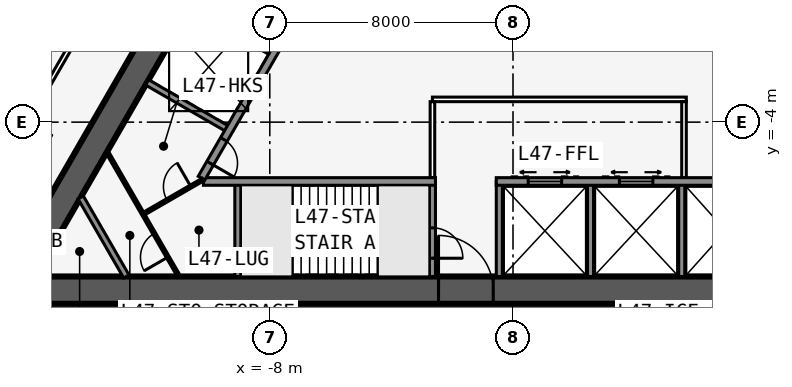
"""IFC4 building model, lengths in metres.
Left out: names, types, materials, properties, quantities, classifications, styles, units other than length and angle.
Written with IfcOpenShell. Run it as: python <this file> out.ifc"""

import sys

from ifc_helpers import new_model, si_unit, direction, frame, frame_2d, origin, place, context, subcontext, project, spatial, rectangle, extrude, element, fill, save


model = new_model("IFC4")
c1 = context("Model", 3, precision=1e-05, world=origin(), true_north=direction((0.0, 1.0)))
c2 = subcontext(c1, "Body", "Model", "MODEL_VIEW")
j1 = project(units=[si_unit("LENGTHUNIT", "METRE"), si_unit("PLANEANGLEUNIT", "RADIAN")], contexts=[c1])
p1 = place(None, origin())
s1 = spatial("IfcSite", under=j1, at=p1, CompositionType="ELEMENT")
p2 = place(p1, origin())
s2 = spatial("IfcBuilding", under=s1, at=p2, CompositionType="ELEMENT")
p3 = place(p2, frame((0.0, 0.0, 175.9)))
s3 = spatial("IfcBuildingStorey", under=s2, at=p3, CompositionType="ELEMENT", Elevation=175.9)
p4 = place(p3, frame((-16.5, -9.526, 0.0), z_axis=(0.0, 0.0, 1.0), x_axis=(1.0, 0.0, 0.0)))
e1 = element("IfcWall", 1, at=p4, inside=s3, PredefinedType="SHEAR", context=c2, shape_type="SweptSolid", body=[
    extrude(rectangle(XDim=33.0, YDim=0.9, at=frame_2d((16.5, 0.0))), origin(), (0.0, 0.0, 1.0), 3.4),
])
p5 = place(p4, frame((14.05, 0.0, 0.0)))
e2 = element("IfcOpeningElement", 2, at=p5, cuts=e1, PredefinedType="OPENING", context=c2, shape_type="SweptSolid", body=[
    extrude(rectangle(XDim=1.8, YDim=2.13, at=frame_2d((0.9, 1.065))), frame((0.0, 0.46, 0.0), z_axis=(0.0, -1.0, 0.0), x_axis=(1.0, 0.0, 0.0)), (0.0, 0.0, 1.0), 0.92),
])
p6 = place(p3, frame((-10.183, -5.951, 0.0), z_axis=(0.0, 0.0, 1.0), x_axis=(1.0, 0.0, 0.0)))
e3 = element("IfcWall", 3, at=p6, inside=s3, PredefinedType="SOLIDWALL", context=c2, shape_type="SweptSolid", body=[
    extrude(rectangle(XDim=7.633, YDim=0.25, at=frame_2d((3.816, 0.0))), origin(), (0.0, 0.0, 1.0), 3.235),
])
p7 = place(p3, frame((-0.55, -5.951, 0.0), z_axis=(0.0, 0.0, 1.0), x_axis=(1.0, 0.0, 0.0)))
e4 = element("IfcWall", 4, at=p7, inside=s3, PredefinedType="SOLIDWALL", context=c2, shape_type="SweptSolid", body=[
    extrude(rectangle(XDim=10.733, YDim=0.25, at=frame_2d((5.366, 0.0))), origin(), (0.0, 0.0, 1.0), 3.235),
])
p8 = place(p7, frame((9.314, 0.0, 0.0)))
e5 = element("IfcOpeningElement", 5, at=p8, cuts=e4, PredefinedType="OPENING", context=c2, shape_type="SweptSolid", body=[
    extrude(rectangle(XDim=0.9, YDim=2.13, at=frame_2d((0.45, 1.065))), frame((0.0, 0.135, 0.0), z_axis=(0.0, -1.0, 0.0), x_axis=(1.0, 0.0, 0.0)), (0.0, 0.0, 1.0), 0.27),
])
p9 = place(p7, frame((1.05, 0.0, 0.0)))
e6 = element("IfcOpeningElement", 6, at=p9, cuts=e4, PredefinedType="OPENING", context=c2, shape_type="SweptSolid", body=[
    extrude(rectangle(XDim=1.1, YDim=2.13, at=frame_2d((0.55, 1.065))), frame((0.0, 0.135, 0.0), z_axis=(0.0, -1.0, 0.0), x_axis=(1.0, 0.0, 0.0)), (0.0, 0.0, 1.0), 0.27),
])
p10 = place(p7, frame((4.05, 0.0, 0.0)))
e7 = element("IfcOpeningElement", 7, at=p10, cuts=e4, PredefinedType="OPENING", context=c2, shape_type="SweptSolid", body=[
    extrude(rectangle(XDim=1.1, YDim=2.13, at=frame_2d((0.55, 1.065))), frame((0.0, 0.135, 0.0), z_axis=(0.0, -1.0, 0.0), x_axis=(1.0, 0.0, 0.0)), (0.0, 0.0, 1.0), 0.27),
])
p11 = place(p3, frame((-9.05, -5.951, 0.0), z_axis=(0.0, 0.0, 1.0), x_axis=(0.0, -1.0, 0.0)))
e8 = element("IfcWall", 8, at=p11, inside=s3, PredefinedType="SOLIDWALL", context=c2, shape_type="SweptSolid", body=[
    extrude(rectangle(XDim=3.125, YDim=0.2, at=frame_2d((1.562, 0.0))), origin(), (0.0, 0.0, 1.0), 3.235),
])
p12 = place(p3, frame((-2.65, -5.951, 0.0), z_axis=(0.0, 0.0, 1.0), x_axis=(0.0, -1.0, 0.0)))
e9 = element("IfcWall", 9, at=p12, inside=s3, PredefinedType="SOLIDWALL", context=c2, shape_type="SweptSolid", body=[
    extrude(rectangle(XDim=3.125, YDim=0.2, at=frame_2d((1.562, 0.0))), origin(), (0.0, 0.0, 1.0), 3.235),
])
p13 = place(p12, frame((1.525, 0.0, 0.0)))
e10 = element("IfcOpeningElement", 10, at=p13, cuts=e9, PredefinedType="OPENING", context=c2, shape_type="SweptSolid", body=[
    extrude(rectangle(XDim=1.0, YDim=2.13, at=frame_2d((0.5, 1.065))), frame((0.0, 0.11, 0.0), z_axis=(0.0, -1.0, 0.0), x_axis=(1.0, 0.0, 0.0)), (0.0, 0.0, 1.0), 0.22),
])
for number, where, z_axis, x_axis in (
    (11, (-0.45, -5.951, 0.0), (0.0, 0.0, 1.0), (0.0, -1.0, 0.0)),
    (12, (2.55, -5.951, 0.0), (0.0, 0.0, 1.0), (0.0, -1.0, 0.0)),
    (13, (5.55, -5.951, 0.0), (0.0, 0.0, 1.0), (0.0, -1.0, 0.0)),
):
    element("IfcWall", number, at=place(p3, frame(where, z_axis=z_axis, x_axis=x_axis)), inside=s3, PredefinedType="SOLIDWALL", context=c2, shape_type="SweptSolid", body=[
        extrude(rectangle(XDim=3.125, YDim=0.2, at=frame_2d((1.562, 0.0))), origin(), (0.0, 0.0, 1.0), 3.235),
    ])
p14 = place(p3, frame((16.5, -9.526, 0.0), z_axis=(0.0, 0.0, 1.0), x_axis=(-0.499999749417, 0.866025548458, 0.0)))
e14 = element("IfcWall", 14, at=p14, inside=s3, PredefinedType="SHEAR", context=c2, shape_type="SweptSolid", body=[
    extrude(rectangle(XDim=33.0, YDim=0.9, at=frame_2d((16.5, 0.0))), origin(), (0.0, 0.0, 1.0), 3.4),
])
p15 = place(p14, frame((14.15, 0.0, 0.0)))
e15 = element("IfcOpeningElement", 15, at=p15, cuts=e14, PredefinedType="OPENING", context=c2, shape_type="SweptSolid", body=[
    extrude(rectangle(XDim=1.8, YDim=2.13, at=frame_2d((0.9, 1.065))), frame((0.0, 0.46, 0.0), z_axis=(0.0, -1.0, 0.0), x_axis=(1.0, 0.0, 0.0)), (0.0, 0.0, 1.0), 0.92),
])
p16 = place(p14, frame((12.6, 0.0, 0.0)))
e16 = element("IfcOpeningElement", 16, at=p16, cuts=e14, PredefinedType="OPENING", context=c2, shape_type="SweptSolid", body=[
    extrude(rectangle(XDim=1.0, YDim=2.13, at=frame_2d((0.5, 1.065))), frame((0.0, 0.46, 0.0), z_axis=(0.0, -1.0, 0.0), x_axis=(1.0, 0.0, 0.0)), (0.0, 0.0, 1.0), 0.92),
])
p17 = place(p3, frame((10.245, -5.843, 0.0), z_axis=(0.0, 0.0, 1.0), x_axis=(-0.499993009313, 0.866029439822, 0.0)))
e17 = element("IfcWall", 17, at=p17, inside=s3, PredefinedType="SOLIDWALL", context=c2, shape_type="SweptSolid", body=[
    extrude(rectangle(XDim=7.733, YDim=0.25, at=frame_2d((3.866, 0.0))), origin(), (0.0, 0.0, 1.0), 3.235),
])
p18 = place(p3, frame((0.0, 19.052, 0.0), z_axis=(0.0, 0.0, 1.0), x_axis=(-0.499999749417, -0.866025548458, 0.0)))
e18 = element("IfcWall", 18, at=p18, inside=s3, PredefinedType="SHEAR", context=c2, shape_type="SweptSolid", body=[
    extrude(rectangle(XDim=33.0, YDim=0.9, at=frame_2d((16.5, 0.0))), origin(), (0.0, 0.0, 1.0), 3.4),
])
p19 = place(p18, frame((14.15, 0.0, 0.0)))
e19 = element("IfcOpeningElement", 19, at=p19, cuts=e18, PredefinedType="OPENING", context=c2, shape_type="SweptSolid", body=[
    extrude(rectangle(XDim=1.8, YDim=2.13, at=frame_2d((0.9, 1.065))), frame((0.0, 0.46, 0.0), z_axis=(0.0, -1.0, 0.0), x_axis=(1.0, 0.0, 0.0)), (0.0, 0.0, 1.0), 0.92),
])
p20 = place(p18, frame((12.6, 0.0, 0.0)))
e20 = element("IfcOpeningElement", 20, at=p20, cuts=e18, PredefinedType="OPENING", context=c2, shape_type="SweptSolid", body=[
    extrude(rectangle(XDim=1.0, YDim=2.13, at=frame_2d((0.5, 1.065))), frame((0.0, 0.46, 0.0), z_axis=(0.0, -1.0, 0.0), x_axis=(1.0, 0.0, 0.0)), (0.0, 0.0, 1.0), 0.92),
])
p21 = place(p3, frame((-4.929, 3.365, 0.0), z_axis=(0.0, 0.0, 1.0), x_axis=(-0.499991433582, -0.866030349552, 0.0)))
e21 = element("IfcWall", 21, at=p21, inside=s3, PredefinedType="SOLIDWALL", context=c2, shape_type="SweptSolid", body=[
    extrude(rectangle(XDim=10.633, YDim=0.25, at=frame_2d((5.316, 0.0))), origin(), (0.0, 0.0, 1.0), 3.235),
])
p22 = place(p21, frame((9.164, 0.0, 0.0)))
e22 = element("IfcOpeningElement", 22, at=p22, cuts=e21, PredefinedType="OPENING", context=c2, shape_type="SweptSolid", body=[
    extrude(rectangle(XDim=0.9, YDim=2.13, at=frame_2d((0.45, 1.065))), frame((0.0, 0.135, 0.0), z_axis=(0.0, -1.0, 0.0), x_axis=(1.0, 0.0, 0.0)), (0.0, 0.0, 1.0), 0.27),
])
for number, where, z_axis, x_axis in (
    (23, (-7.879, -1.744, 0.0), (0.0, 0.0, 1.0), (-0.866, 0.5, 0.0)),
    (24, (-9.329, -4.256, 0.0), (0.0, 0.0, 1.0), (-0.866, 0.5, 0.0)),
):
    element("IfcWall", number, at=place(p3, frame(where, z_axis=z_axis, x_axis=x_axis)), inside=s3, PredefinedType="SOLIDWALL", context=c2, shape_type="SweptSolid", body=[
        extrude(rectangle(XDim=3.125, YDim=0.2, at=frame_2d((1.562, 0.0))), origin(), (0.0, 0.0, 1.0), 3.235),
    ])
p23 = place(p3, frame((20.027, -10.985, 0.0), z_axis=(0.0, 0.0, 1.0), x_axis=(-0.500001677587, 0.866024435227, 0.0)))
e25 = element("IfcWall", 25, at=p23, inside=s3, PredefinedType="PARTITIONING", context=c2, shape_type="SweptSolid", body=[
    extrude(rectangle(XDim=39.054, YDim=0.15, at=frame_2d((19.527, 0.0))), origin(), (0.0, 0.0, 1.0), 3.235),
])
p24 = place(p23, frame((1.558, 0.0, 0.0)))
e26 = element("IfcOpeningElement", 26, at=p24, cuts=e25, PredefinedType="OPENING", context=c2, shape_type="SweptSolid", body=[
    extrude(rectangle(XDim=0.95, YDim=2.13, at=frame_2d((0.475, 1.065))), frame((0.0, 0.085, 0.0), z_axis=(0.0, -1.0, 0.0), x_axis=(1.0, 0.0, 0.0)), (0.0, 0.0, 1.0), 0.17),
])
p25 = place(p23, frame((11.552, 0.0, 0.0)))
e27 = element("IfcOpeningElement", 27, at=p25, cuts=e25, PredefinedType="OPENING", context=c2, shape_type="SweptSolid", body=[
    extrude(rectangle(XDim=0.95, YDim=2.13, at=frame_2d((0.475, 1.065))), frame((0.0, 0.085, 0.0), z_axis=(0.0, -1.0, 0.0), x_axis=(1.0, 0.0, 0.0)), (0.0, 0.0, 1.0), 0.17),
])
p26 = place(p23, frame((25.352, 0.0, 0.0)))
e28 = element("IfcOpeningElement", 28, at=p26, cuts=e25, PredefinedType="OPENING", context=c2, shape_type="SweptSolid", body=[
    extrude(rectangle(XDim=0.95, YDim=2.13, at=frame_2d((0.475, 1.065))), frame((0.0, 0.085, 0.0), z_axis=(0.0, -1.0, 0.0), x_axis=(1.0, 0.0, 0.0)), (0.0, 0.0, 1.0), 0.17),
])
p27 = place(p23, frame((36.546, 0.0, 0.0)))
e29 = element("IfcOpeningElement", 29, at=p27, cuts=e25, PredefinedType="OPENING", context=c2, shape_type="SweptSolid", body=[
    extrude(rectangle(XDim=0.95, YDim=2.13, at=frame_2d((0.475, 1.065))), frame((0.0, 0.085, 0.0), z_axis=(0.0, -1.0, 0.0), x_axis=(1.0, 0.0, 0.0)), (0.0, 0.0, 1.0), 0.17),
])
p28 = place(p3, frame((-0.5, 22.836, 0.0), z_axis=(0.0, 0.0, 1.0), x_axis=(-0.500001677587, -0.866024435227, 0.0)))
e30 = element("IfcWall", 30, at=p28, inside=s3, PredefinedType="PARTITIONING", context=c2, shape_type="SweptSolid", body=[
    extrude(rectangle(XDim=39.054, YDim=0.15, at=frame_2d((19.527, 0.0))), origin(), (0.0, 0.0, 1.0), 3.235),
])
p29 = place(p28, frame((0.352, 0.0, 0.0)))
e31 = element("IfcOpeningElement", 31, at=p29, cuts=e30, PredefinedType="OPENING", context=c2, shape_type="SweptSolid", body=[
    extrude(rectangle(XDim=0.95, YDim=2.13, at=frame_2d((0.475, 1.065))), frame((0.0, 0.085, 0.0), z_axis=(0.0, -1.0, 0.0), x_axis=(1.0, 0.0, 0.0)), (0.0, 0.0, 1.0), 0.17),
])
p30 = place(p28, frame((6.552, 0.0, 0.0)))
e32 = element("IfcOpeningElement", 32, at=p30, cuts=e30, PredefinedType="OPENING", context=c2, shape_type="SweptSolid", body=[
    extrude(rectangle(XDim=0.95, YDim=2.13, at=frame_2d((0.475, 1.065))), frame((0.0, 0.085, 0.0), z_axis=(0.0, -1.0, 0.0), x_axis=(1.0, 0.0, 0.0)), (0.0, 0.0, 1.0), 0.17),
])
p31 = place(p28, frame((15.952, 0.0, 0.0)))
e33 = element("IfcOpeningElement", 33, at=p31, cuts=e30, PredefinedType="OPENING", context=c2, shape_type="SweptSolid", body=[
    extrude(rectangle(XDim=0.95, YDim=2.13, at=frame_2d((0.475, 1.065))), frame((0.0, 0.085, 0.0), z_axis=(0.0, -1.0, 0.0), x_axis=(1.0, 0.0, 0.0)), (0.0, 0.0, 1.0), 0.17),
])
p32 = place(p28, frame((21.552, 0.0, 0.0)))
e34 = element("IfcOpeningElement", 34, at=p32, cuts=e30, PredefinedType="OPENING", context=c2, shape_type="SweptSolid", body=[
    extrude(rectangle(XDim=0.95, YDim=2.13, at=frame_2d((0.475, 1.065))), frame((0.0, 0.085, 0.0), z_axis=(0.0, -1.0, 0.0), x_axis=(1.0, 0.0, 0.0)), (0.0, 0.0, 1.0), 0.17),
])
p33 = place(p28, frame((30.952, 0.0, 0.0)))
e35 = element("IfcOpeningElement", 35, at=p33, cuts=e30, PredefinedType="OPENING", context=c2, shape_type="SweptSolid", body=[
    extrude(rectangle(XDim=0.95, YDim=2.13, at=frame_2d((0.475, 1.065))), frame((0.0, 0.085, 0.0), z_axis=(0.0, -1.0, 0.0), x_axis=(1.0, 0.0, 0.0)), (0.0, 0.0, 1.0), 0.17),
])
p34 = place(p28, frame((37.752, 0.0, 0.0)))
e36 = element("IfcOpeningElement", 36, at=p34, cuts=e30, PredefinedType="OPENING", context=c2, shape_type="SweptSolid", body=[
    extrude(rectangle(XDim=0.95, YDim=2.13, at=frame_2d((0.475, 1.065))), frame((0.0, 0.085, 0.0), z_axis=(0.0, -1.0, 0.0), x_axis=(1.0, 0.0, 0.0)), (0.0, 0.0, 1.0), 0.17),
])
p35 = place(p3, frame((-2.65, -3.251, 0.0), z_axis=(0.0, 0.0, 1.0), x_axis=(1.0, 0.0, 0.0)))
e37 = element("IfcWall", 37, at=p35, inside=s3, PredefinedType="PARTITIONING", context=c2, shape_type="SweptSolid", body=[
    extrude(rectangle(XDim=8.35, YDim=0.15, at=frame_2d((4.175, 0.0))), origin(), (0.0, 0.0, 1.0), 3.235),
])
for number, where, z_axis, x_axis in (
    (38, (-2.65, -5.826, 0.0), (0.0, 0.0, 1.0), (0.0, 1.0, 0.0)),
    (39, (5.625, -5.826, 0.0), (0.0, 0.0, 1.0), (0.0, 1.0, 0.0)),
):
    element("IfcWall", number, at=place(p3, frame(where, z_axis=z_axis, x_axis=x_axis)), inside=s3, PredefinedType="PARTITIONING", context=c2, shape_type="SweptSolid", body=[
        extrude(rectangle(XDim=2.5, YDim=0.15, at=frame_2d((1.25, 0.0))), origin(), (0.0, 0.0, 1.0), 3.235),
    ])
p36 = place(p3, frame((-12.719, -9.076, 0.0), z_axis=(0.0, 0.0, 1.0), x_axis=(-0.499952404951, 0.866052881055, 0.0)))
e40 = element("IfcWall", 40, at=p36, inside=s3, PredefinedType="SOLIDWALL", context=c2, shape_type="SweptSolid", body=[
    extrude(rectangle(XDim=3.002, YDim=0.2, at=frame_2d((1.501, 0.0))), origin(), (0.0, 0.0, 1.0), 3.235),
])
p37 = place(p3, frame((-10.986, -9.076, 0.0), z_axis=(0.0, 0.0, 1.0), x_axis=(-0.499999210213, 0.866025859768, 0.0)))
e41 = element("IfcWall", 41, at=p37, inside=s3, PredefinedType="PARTITIONING", context=c2, shape_type="SweptSolid", body=[
    extrude(rectangle(XDim=4.734, YDim=0.1, at=frame_2d((2.367, 0.0))), origin(), (0.0, 0.0, 1.0), 3.235),
])
p38 = place(p37, frame((0.734, 0.0, 0.0)))
e42 = element("IfcOpeningElement", 42, at=p38, cuts=e41, PredefinedType="OPENING", context=c2, shape_type="SweptSolid", body=[
    extrude(rectangle(XDim=0.9, YDim=2.13, at=frame_2d((0.45, 1.065))), frame((0.0, 0.06, 0.0), z_axis=(0.0, -1.0, 0.0), x_axis=(1.0, 0.0, 0.0)), (0.0, 0.0, 1.0), 0.12),
])
p39 = place(p3, frame((-12.17, -7.026, 0.0), z_axis=(0.0, 0.0, 1.0), x_axis=(0.866015833478, 0.50001657589, 0.0)))
e43 = element("IfcWall", 43, at=p39, inside=s3, PredefinedType="PARTITIONING", context=c2, shape_type="SweptSolid", body=[
    extrude(rectangle(XDim=2.275, YDim=0.1, at=frame_2d((1.138, 0.0))), origin(), (0.0, 0.0, 1.0), 3.235),
])
p40 = place(p39, frame((0.915, 0.0, 0.0)))
e44 = element("IfcOpeningElement", 44, at=p40, cuts=e43, PredefinedType="OPENING", context=c2, shape_type="SweptSolid", body=[
    extrude(rectangle(XDim=0.9, YDim=2.13, at=frame_2d((0.45, 1.065))), frame((0.0, 0.06, 0.0), z_axis=(0.0, -1.0, 0.0), x_axis=(1.0, 0.0, 0.0)), (0.0, 0.0, 1.0), 0.12),
])
p41 = place(p3, frame((-7.247, -7.576, 0.0), z_axis=(0.0, 0.0, 1.0), x_axis=(1.0, 0.0, 0.0)))
e45 = element("IfcWall", 45, at=p41, inside=s3, PredefinedType="SOLIDWALL", context=c2, shape_type="SweptSolid", body=[
    extrude(rectangle(XDim=2.794, YDim=0.1, at=frame_2d((1.397, 0.0))), origin(), (0.0, 0.0, 1.0), 3.4),
])
p42 = place(p5, origin())
e46 = element("IfcDoor", 46, at=p42, inside=s3, OperationType="DOUBLE_DOOR_SINGLE_SWING", PredefinedType="DOOR", context=c2, shape_type="SweptSolid", body=[
    extrude(rectangle(XDim=1.8, YDim=2.13, at=frame_2d((0.9, 1.065))), frame((0.0, 0.025, 0.0), z_axis=(0.0, -1.0, 0.0), x_axis=(1.0, 0.0, 0.0)), (0.0, 0.0, 1.0), 0.05),
])
fill(e2, e46)
p43 = place(p13, origin())
e47 = element("IfcDoor", 47, at=p43, inside=s3, OperationType="SINGLE_SWING_RIGHT", PredefinedType="DOOR", context=c2, shape_type="SweptSolid", body=[
    extrude(rectangle(XDim=1.0, YDim=2.13, at=frame_2d((0.5, 1.065))), frame((0.0, 0.025, 0.0), z_axis=(0.0, -1.0, 0.0), x_axis=(1.0, 0.0, 0.0)), (0.0, 0.0, 1.0), 0.05),
])
fill(e10, e47)
p44 = place(p38, origin())
e48 = element("IfcDoor", 48, at=p44, inside=s3, OperationType="SINGLE_SWING_LEFT", PredefinedType="DOOR", context=c2, shape_type="SweptSolid", body=[
    extrude(rectangle(XDim=0.9, YDim=2.13, at=frame_2d((0.45, 1.065))), frame((0.0, 0.025, 0.0), z_axis=(0.0, -1.0, 0.0), x_axis=(1.0, 0.0, 0.0)), (0.0, 0.0, 1.0), 0.05),
])
fill(e42, e48)
p45 = place(p22, origin())
e49 = element("IfcDoor", 49, at=p45, inside=s3, OperationType="SINGLE_SWING_RIGHT", PredefinedType="DOOR", context=c2, shape_type="SweptSolid", body=[
    extrude(rectangle(XDim=0.9, YDim=2.13, at=frame_2d((0.45, 1.065))), frame((0.0, 0.025, 0.0), z_axis=(0.0, -1.0, 0.0), x_axis=(1.0, 0.0, 0.0)), (0.0, 0.0, 1.0), 0.05),
])
fill(e22, e49)
p46 = place(p40, origin())
e50 = element("IfcDoor", 50, at=p46, inside=s3, OperationType="SINGLE_SWING_RIGHT", PredefinedType="DOOR", context=c2, shape_type="SweptSolid", body=[
    extrude(rectangle(XDim=0.9, YDim=2.13, at=frame_2d((0.45, 1.065))), frame((0.0, 0.025, 0.0), z_axis=(0.0, -1.0, 0.0), x_axis=(1.0, 0.0, 0.0)), (0.0, 0.0, 1.0), 0.05),
])
fill(e44, e50)
p47 = place(p9, origin())
e51 = element("IfcDoor", 51, at=p47, inside=s3, OperationType="DOUBLE_DOOR_SLIDING", PredefinedType="USERDEFINED", context=c2, shape_type="SweptSolid", body=[
    extrude(rectangle(XDim=1.1, YDim=2.13, at=frame_2d((0.55, 1.065))), frame((0.0, 0.025, 0.0), z_axis=(0.0, -1.0, 0.0), x_axis=(1.0, 0.0, 0.0)), (0.0, 0.0, 1.0), 0.05),
])
fill(e6, e51)
p48 = place(p10, origin())
e52 = element("IfcDoor", 52, at=p48, inside=s3, OperationType="DOUBLE_DOOR_SLIDING", PredefinedType="USERDEFINED", context=c2, shape_type="SweptSolid", body=[
    extrude(rectangle(XDim=1.1, YDim=2.13, at=frame_2d((0.55, 1.065))), frame((0.0, 0.025, 0.0), z_axis=(0.0, -1.0, 0.0), x_axis=(1.0, 0.0, 0.0)), (0.0, 0.0, 1.0), 0.05),
])
fill(e7, e52)
save(model, sys.argv[1])
